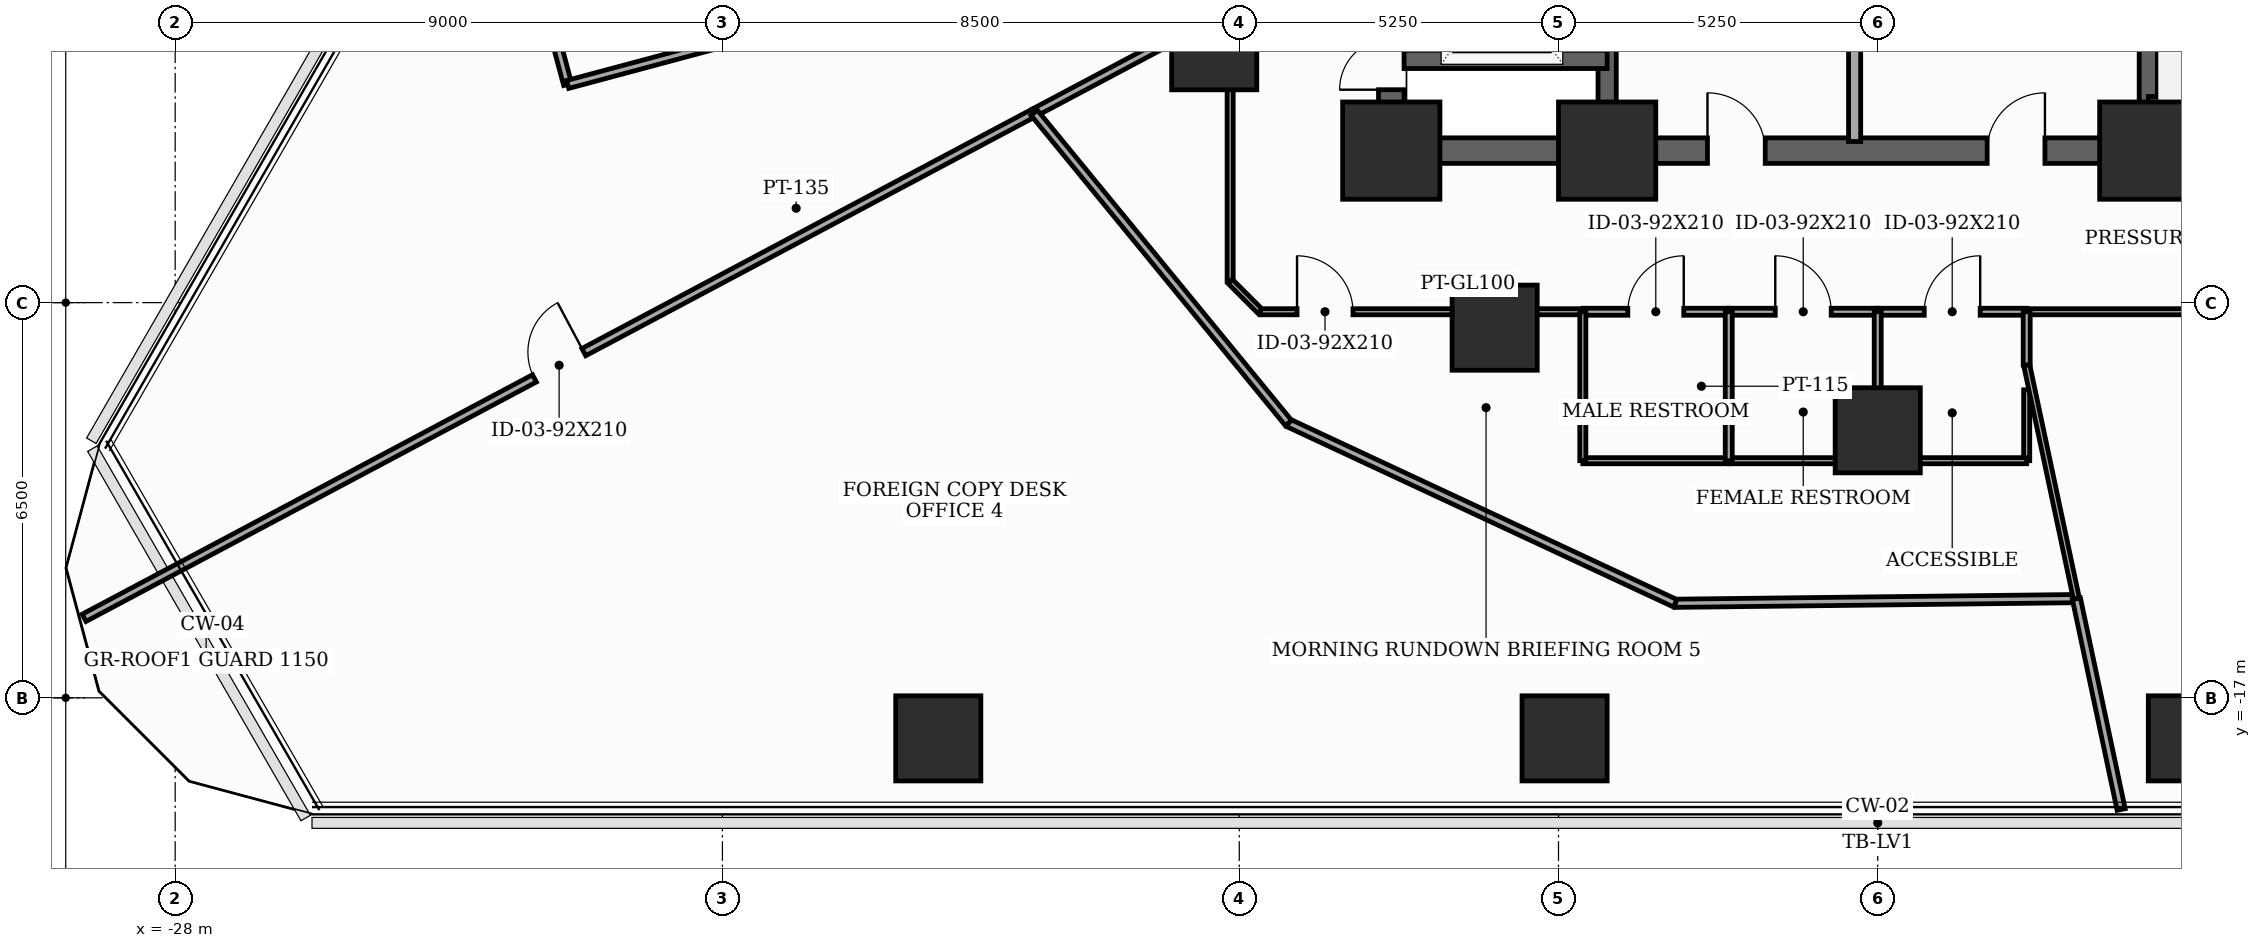
"""IFC4 building model, lengths in metres.
Left out: names, types, materials, properties, quantities, classifications, styles, units other than length and angle.
Written with IfcOpenShell. Run it as: python <this file> out.ifc"""

import sys

from ifc_helpers import new_model, si_unit, direction, frame, frame_2d, origin, origin_2d, place, context, subcontext, project, spatial, rectangle, extrude, element, fill, save


model = new_model("IFC4")
c1 = context("Model", 3, precision=1e-05, world=origin(), true_north=direction((0.0, 1.0)))
c2 = subcontext(c1, "Body", "Model", "MODEL_VIEW")
j1 = project(units=[si_unit("LENGTHUNIT", "METRE"), si_unit("PLANEANGLEUNIT", "RADIAN")], contexts=[c1])
p1 = place(None, origin())
s1 = spatial("IfcSite", under=j1, at=p1, CompositionType="ELEMENT")
p2 = place(p1, origin())
s2 = spatial("IfcBuilding", under=s1, at=p2, CompositionType="ELEMENT")
p3 = place(p2, frame((0.0, 0.0, 33.4)))
s3 = spatial("IfcBuildingStorey", under=s2, at=p3, CompositionType="ELEMENT", Elevation=33.4)
for number, where, z_axis, x_axis in (
    (1, (-8.0, -8.0, 0.0), (0.0, 0.0, 1.0), (1.0, 0.0, 0.0)),
    (2, (-4.45, -8.0, 0.0), (0.0, 0.0, 1.0), (1.0, 0.0, 0.0)),
    (3, (4.45, -8.0, 0.0), (0.0, 0.0, 1.0), (1.0, 0.0, 0.0)),
):
    element("IfcColumn", number, at=place(p3, frame(where, z_axis=z_axis, x_axis=x_axis)), inside=s3, PredefinedType="COLUMN", context=c2, shape_type="SweptSolid", body=[
        extrude(rectangle(XDim=1.6, YDim=1.6, at=origin_2d()), origin(), (0.0, 0.0, 1.0), 3.7),
    ])
for number, where, z_axis, x_axis in (
    (4, (-10.912, -6.3, 0.0), (0.0, 0.0, 1.0), (1.0, 0.0, 0.0)),
    (5, (-6.3, -10.912, 0.0), (0.0, 0.0, 1.0), (1.0, 0.0, 0.0)),
    (6, (0.0, -12.6, 0.0), (0.0, 0.0, 1.0), (1.0, 0.0, 0.0)),
    (7, (-15.45, -17.667, 0.0), (0.0, 0.0, 1.0), (1.0, 0.0, 0.0)),
    (8, (-5.15, -17.667, 0.0), (0.0, 0.0, 1.0), (1.0, 0.0, 0.0)),
    (9, (5.15, -17.667, 0.0), (0.0, 0.0, 1.0), (1.0, 0.0, 0.0)),
):
    element("IfcColumn", number, at=place(p3, frame(where, z_axis=z_axis, x_axis=x_axis)), inside=s3, PredefinedType="COLUMN", context=c2, shape_type="SweptSolid", body=[
        extrude(rectangle(XDim=1.4, YDim=1.4, at=origin_2d()), origin(), (0.0, 0.0, 1.0), 3.7),
    ])
p4 = place(p3, frame((-8.0, -8.0, 0.0), z_axis=(0.0, 0.0, 1.0), x_axis=(0.0, 1.0, 0.0)))
e10 = element("IfcWall", 10, at=p4, inside=s3, PredefinedType="SHEAR", context=c2, shape_type="SweptSolid", body=[
    extrude(rectangle(XDim=16.0, YDim=0.42, at=frame_2d((8.0, 0.0))), origin(), (0.0, 0.0, 1.0), 3.5),
])
p5 = place(p4, frame((1.002, 0.0, 0.0)))
e11 = element("IfcOpeningElement", 11, at=p5, cuts=e10, PredefinedType="OPENING", context=c2, shape_type="SweptSolid", body=[
    extrude(rectangle(XDim=0.85, YDim=2.02, at=frame_2d((0.425, 1.01))), frame((0.0, 0.22, 0.0), z_axis=(0.0, -1.0, 0.0), x_axis=(1.0, 0.0, 0.0)), (0.0, 0.0, 1.0), 0.44),
])
p6 = place(p4, frame((5.35, 0.0, 0.0)))
e12 = element("IfcOpeningElement", 12, at=p6, cuts=e10, PredefinedType="OPENING", context=c2, shape_type="SweptSolid", body=[
    extrude(rectangle(XDim=1.05, YDim=2.15, at=frame_2d((0.525, 1.075))), frame((0.0, 0.22, 0.0), z_axis=(0.0, -1.0, 0.0), x_axis=(1.0, 0.0, 0.0)), (0.0, 0.0, 1.0), 0.44),
])
p7 = place(p3, frame((-8.0, -8.0, 0.0), z_axis=(0.0, 0.0, 1.0), x_axis=(1.0, 0.0, 0.0)))
e13 = element("IfcWall", 13, at=p7, inside=s3, PredefinedType="SHEAR", context=c2, shape_type="SweptSolid", body=[
    extrude(rectangle(XDim=16.0, YDim=0.42, at=frame_2d((8.0, 0.0))), origin(), (0.0, 0.0, 1.0), 3.5),
])
p8 = place(p7, frame((5.2, 0.0, 0.0)))
e14 = element("IfcOpeningElement", 14, at=p8, cuts=e13, PredefinedType="OPENING", context=c2, shape_type="SweptSolid", body=[
    extrude(rectangle(XDim=0.95, YDim=2.1, at=frame_2d((0.475, 1.05))), frame((0.0, 0.22, 0.0), z_axis=(0.0, -1.0, 0.0), x_axis=(1.0, 0.0, 0.0)), (0.0, 0.0, 1.0), 0.44),
])
p9 = place(p7, frame((9.8, 0.0, 0.0)))
e15 = element("IfcOpeningElement", 15, at=p9, cuts=e13, PredefinedType="OPENING", context=c2, shape_type="SweptSolid", body=[
    extrude(rectangle(XDim=0.95, YDim=2.1, at=frame_2d((0.475, 1.05))), frame((0.0, 0.22, 0.0), z_axis=(0.0, -1.0, 0.0), x_axis=(1.0, 0.0, 0.0)), (0.0, 0.0, 1.0), 0.44),
])
for number, where, z_axis, x_axis in (
    (16, (-4.45, -7.79, 0.0), (0.0, 0.0, 1.0), (0.0, 1.0, 0.0)),
    (17, (4.45, -7.79, 0.0), (0.0, 0.0, 1.0), (0.0, 1.0, 0.0)),
):
    element("IfcWall", number, at=place(p3, frame(where, z_axis=z_axis, x_axis=x_axis)), inside=s3, PredefinedType="SHEAR", context=c2, shape_type="SweptSolid", body=[
        extrude(rectangle(XDim=15.58, YDim=0.3, at=frame_2d((7.79, 0.0))), origin(), (0.0, 0.0, 1.0), 3.5),
    ])
p10 = place(p3, frame((4.45, -7.26, 0.0), z_axis=(0.0, 0.0, 1.0), x_axis=(1.0, 0.0, 0.0)))
e18 = element("IfcWall", 18, at=p10, inside=s3, PredefinedType="SHEAR", context=c2, shape_type="SweptSolid", body=[
    extrude(rectangle(XDim=3.55, YDim=0.3, at=frame_2d((1.775, 0.0))), origin(), (0.0, 0.0, 1.0), 3.5),
])
p11 = place(p3, frame((-7.79, -6.5, 0.0), z_axis=(0.0, 0.0, 1.0), x_axis=(1.0, 0.0, 0.0)))
e19 = element("IfcWall", 19, at=p11, inside=s3, PredefinedType="SHEAR", context=c2, shape_type="SweptSolid", body=[
    extrude(rectangle(XDim=3.34, YDim=0.3, at=frame_2d((1.67, 0.0))), origin(), (0.0, 0.0, 1.0), 3.5),
])
p12 = place(p3, frame((-0.38, -7.85, 0.0), z_axis=(0.0, 0.0, 1.0), x_axis=(0.0, 1.0, 0.0)))
e20 = element("IfcWall", 20, at=p12, inside=s3, PredefinedType="SOLIDWALL", context=c2, shape_type="SweptSolid", body=[
    extrude(rectangle(XDim=2.95, YDim=0.2, at=frame_2d((1.475, 0.0))), origin(), (0.0, 0.0, 1.0), 2.885),
])
p13 = place(p3, frame((-22.115, -4.787, 0.0), z_axis=(0.0, 0.0, 1.0), x_axis=(0.259105843213, -0.965848933329, 0.0)))
e21 = element("IfcWall", 21, at=p13, inside=s3, PredefinedType="PARTITIONING", context=c2, shape_type="SweptSolid", body=[
    extrude(rectangle(XDim=2.2, YDim=0.135, at=frame_2d((1.1, 0.0))), origin(), (0.0, 0.0, 1.0), 2.935),
])
p14 = place(p3, frame((-21.545, -6.912, 0.0), z_axis=(0.0, 0.0, 1.0), x_axis=(0.965906888357, 0.258889712088, 0.0)))
e22 = element("IfcWall", 22, at=p14, inside=s3, PredefinedType="PARTITIONING", context=c2, shape_type="SweptSolid", body=[
    extrude(rectangle(XDim=11.28, YDim=0.135, at=frame_2d((5.64, 0.0))), origin(), (0.0, 0.0, 1.0), 2.785),
])
p15 = place(p3, frame((-10.65, -5.663, 0.0), z_axis=(0.0, 0.0, 1.0), x_axis=(0.0, -1.0, 0.0)))
e23 = element("IfcWall", 23, at=p15, inside=s3, PredefinedType="MOVABLE", context=c2, shape_type="SweptSolid", body=[
    extrude(rectangle(XDim=4.487, YDim=0.1, at=frame_2d((2.243, 0.0))), origin(), (0.0, 0.0, 1.0), 2.785),
])
p16 = place(p3, frame((-10.65, -10.15, 0.0), z_axis=(0.0, 0.0, 1.0), x_axis=(0.707106781187, -0.707106781187, 0.0)))
e24 = element("IfcWall", 24, at=p16, inside=s3, PredefinedType="MOVABLE", context=c2, shape_type="SweptSolid", body=[
    extrude(rectangle(XDim=0.707, YDim=0.1, at=frame_2d((0.354, 0.0))), origin(), (0.0, 0.0, 1.0), 3.5),
])
p17 = place(p3, frame((-10.15, -10.65, 0.0), z_axis=(0.0, 0.0, 1.0), x_axis=(1.0, 0.0, 0.0)))
e25 = element("IfcWall", 25, at=p17, inside=s3, PredefinedType="MOVABLE", context=c2, shape_type="SweptSolid", body=[
    extrude(rectangle(XDim=5.3, YDim=0.1, at=frame_2d((2.65, 0.0))), origin(), (0.0, 0.0, 1.0), 2.785),
])
p18 = place(p17, frame((0.6, 0.0, 0.0)))
e26 = element("IfcOpeningElement", 26, at=p18, cuts=e25, PredefinedType="OPENING", context=c2, shape_type="SweptSolid", body=[
    extrude(rectangle(XDim=0.92, YDim=2.1, at=frame_2d((0.46, 1.05))), frame((0.0, 0.06, 0.0), z_axis=(0.0, -1.0, 0.0), x_axis=(1.0, 0.0, 0.0)), (0.0, 0.0, 1.0), 0.12),
])
p19 = place(p3, frame((-4.85, -10.65, 0.0), z_axis=(0.0, 0.0, 1.0), x_axis=(1.0, 0.0, 0.0)))
e27 = element("IfcWall", 27, at=p19, inside=s3, PredefinedType="PARTITIONING", context=c2, shape_type="SweptSolid", body=[
    extrude(rectangle(XDim=2.4, YDim=0.115, at=frame_2d((1.2, 0.0))), origin(), (0.0, 0.0, 1.0), 3.5),
])
p20 = place(p19, frame((0.74, 0.0, 0.0)))
e28 = element("IfcOpeningElement", 28, at=p20, cuts=e27, PredefinedType="OPENING", context=c2, shape_type="SweptSolid", body=[
    extrude(rectangle(XDim=0.92, YDim=2.1, at=frame_2d((0.46, 1.05))), frame((0.0, 0.067, 0.0), z_axis=(0.0, -1.0, 0.0), x_axis=(1.0, 0.0, 0.0)), (0.0, 0.0, 1.0), 0.135),
])
p21 = place(p3, frame((-2.45, -10.65, 0.0), z_axis=(0.0, 0.0, 1.0), x_axis=(1.0, 0.0, 0.0)))
e29 = element("IfcWall", 29, at=p21, inside=s3, PredefinedType="PARTITIONING", context=c2, shape_type="SweptSolid", body=[
    extrude(rectangle(XDim=2.45, YDim=0.115, at=frame_2d((1.225, 0.0))), origin(), (0.0, 0.0, 1.0), 2.785),
])
p22 = place(p21, frame((0.765, 0.0, 0.0)))
e30 = element("IfcOpeningElement", 30, at=p22, cuts=e29, PredefinedType="OPENING", context=c2, shape_type="SweptSolid", body=[
    extrude(rectangle(XDim=0.92, YDim=2.1, at=frame_2d((0.46, 1.05))), frame((0.0, 0.067, 0.0), z_axis=(0.0, -1.0, 0.0), x_axis=(1.0, 0.0, 0.0)), (0.0, 0.0, 1.0), 0.135),
])
p23 = place(p3, frame((0.0, -10.65, 0.0), z_axis=(0.0, 0.0, 1.0), x_axis=(1.0, 0.0, 0.0)))
e31 = element("IfcWall", 31, at=p23, inside=s3, PredefinedType="PARTITIONING", context=c2, shape_type="SweptSolid", body=[
    extrude(rectangle(XDim=2.45, YDim=0.115, at=frame_2d((1.225, 0.0))), origin(), (0.0, 0.0, 1.0), 3.5),
])
p24 = place(p23, frame((0.765, 0.0, 0.0)))
e32 = element("IfcOpeningElement", 32, at=p24, cuts=e31, PredefinedType="OPENING", context=c2, shape_type="SweptSolid", body=[
    extrude(rectangle(XDim=0.92, YDim=2.1, at=frame_2d((0.46, 1.05))), frame((0.0, 0.067, 0.0), z_axis=(0.0, -1.0, 0.0), x_axis=(1.0, 0.0, 0.0)), (0.0, 0.0, 1.0), 0.135),
])
p25 = place(p3, frame((2.45, -10.65, 0.0), z_axis=(0.0, 0.0, 1.0), x_axis=(1.0, 0.0, 0.0)))
e33 = element("IfcWall", 33, at=p25, inside=s3, PredefinedType="MOVABLE", context=c2, shape_type="SweptSolid", body=[
    extrude(rectangle(XDim=7.7, YDim=0.1, at=frame_2d((3.85, 0.0))), origin(), (0.0, 0.0, 1.0), 2.785),
])
p26 = place(p3, frame((-29.498, -15.684, 0.0), z_axis=(0.0, 0.0, 1.0), x_axis=(0.882944182352, 0.46947797696, 0.0)))
e34 = element("IfcWall", 34, at=p26, inside=s3, PredefinedType="PARTITIONING", context=c2, shape_type="SweptSolid", body=[
    extrude(rectangle(XDim=17.697, YDim=0.135, at=frame_2d((8.848, 0.0))), origin(), (0.0, 0.0, 1.0), 2.935),
])
p27 = place(p26, frame((8.388, 0.0, 0.0)))
e35 = element("IfcOpeningElement", 35, at=p27, cuts=e34, PredefinedType="OPENING", context=c2, shape_type="SweptSolid", body=[
    extrude(rectangle(XDim=0.92, YDim=2.1, at=frame_2d((0.46, 1.05))), frame((0.0, 0.077, 0.0), z_axis=(0.0, -1.0, 0.0), x_axis=(1.0, 0.0, 0.0)), (0.0, 0.0, 1.0), 0.155),
])
p28 = place(p3, frame((-13.873, -7.376, 0.0), z_axis=(0.0, 0.0, 1.0), x_axis=(0.883048160598, 0.469282373486, 0.0)))
e36 = element("IfcWall", 36, at=p28, inside=s3, PredefinedType="PARTITIONING", context=c2, shape_type="SweptSolid", body=[
    extrude(rectangle(XDim=3.65, YDim=0.135, at=frame_2d((1.825, 0.0))), origin(), (0.0, 0.0, 1.0), 2.785),
])
p29 = place(p3, frame((3.267, -15.368, 0.0), z_axis=(0.0, 0.0, 1.0), x_axis=(-0.999931630146, -0.011693375588, 0.0)))
e37 = element("IfcWall", 37, at=p29, inside=s3, PredefinedType="PARTITIONING", context=c2, shape_type="SweptSolid", body=[
    extrude(rectangle(XDim=6.598, YDim=0.135, at=frame_2d((3.299, 0.0))), origin(), (0.0, 0.0, 1.0), 3.5),
])
p30 = place(p3, frame((-3.33, -15.445, 0.0), z_axis=(0.0, 0.0, 1.0), x_axis=(-0.90631018164, 0.422613126458, 0.0)))
e38 = element("IfcWall", 38, at=p30, inside=s3, PredefinedType="PARTITIONING", context=c2, shape_type="SweptSolid", body=[
    extrude(rectangle(XDim=7.018, YDim=0.135, at=frame_2d((3.509, 0.0))), origin(), (0.0, 0.0, 1.0), 2.685),
])
p31 = place(p3, frame((-9.691, -12.479, 0.0), z_axis=(0.0, 0.0, 1.0), x_axis=(-0.633866270814, 0.773442661562, 0.0)))
e39 = element("IfcWall", 39, at=p31, inside=s3, PredefinedType="PARTITIONING", context=c2, shape_type="SweptSolid", body=[
    extrude(rectangle(XDim=6.598, YDim=0.135, at=frame_2d((3.299, 0.0))), origin(), (0.0, 0.0, 1.0), 3.5),
])
p32 = place(p3, frame((4.003, -18.837, 0.0), z_axis=(0.0, 0.0, 1.0), x_axis=(-0.207633969896, 0.978206590933, 0.0)))
e40 = element("IfcWall", 40, at=p32, inside=s3, PredefinedType="PARTITIONING", context=c2, shape_type="SweptSolid", body=[
    extrude(rectangle(XDim=3.546, YDim=0.135, at=frame_2d((1.773, 0.0))), origin(), (0.0, 0.0, 1.0), 2.935),
])
p33 = place(p3, frame((-2.45, -13.1, 0.0), z_axis=(0.0, 0.0, 1.0), x_axis=(-1.0, 0.0, 0.0)))
e41 = element("IfcWall", 41, at=p33, inside=s3, PredefinedType="MOVABLE", context=c2, shape_type="SweptSolid", body=[
    extrude(rectangle(XDim=2.4, YDim=0.1, at=frame_2d((1.2, 0.0))), origin(), (0.0, 0.0, 1.0), 3.5),
])
p34 = place(p3, frame((-4.85, -13.1, 0.0), z_axis=(0.0, 0.0, 1.0), x_axis=(0.0, 1.0, 0.0)))
e42 = element("IfcWall", 42, at=p34, inside=s3, PredefinedType="MOVABLE", context=c2, shape_type="SweptSolid", body=[
    extrude(rectangle(XDim=2.45, YDim=0.1, at=frame_2d((1.225, 0.0))), origin(), (0.0, 0.0, 1.0), 2.785),
])
p35 = place(p3, frame((0.0, -13.1, 0.0), z_axis=(0.0, 0.0, 1.0), x_axis=(-1.0, 0.0, 0.0)))
e43 = element("IfcWall", 43, at=p35, inside=s3, PredefinedType="MOVABLE", context=c2, shape_type="SweptSolid", body=[
    extrude(rectangle(XDim=2.45, YDim=0.1, at=frame_2d((1.225, 0.0))), origin(), (0.0, 0.0, 1.0), 3.5),
])
p36 = place(p3, frame((2.45, -11.935, 0.0), z_axis=(0.0, 0.0, 1.0), x_axis=(0.0, -1.0, 0.0)))
e44 = element("IfcWall", 44, at=p36, inside=s3, PredefinedType="MOVABLE", context=c2, shape_type="SweptSolid", body=[
    extrude(rectangle(XDim=1.166, YDim=0.1, at=frame_2d((0.583, 0.0))), origin(), (0.0, 0.0, 1.0), 2.785),
])
p37 = place(p3, frame((2.45, -13.1, 0.0), z_axis=(0.0, 0.0, 1.0), x_axis=(-1.0, 0.0, 0.0)))
e45 = element("IfcWall", 45, at=p37, inside=s3, PredefinedType="MOVABLE", context=c2, shape_type="SweptSolid", body=[
    extrude(rectangle(XDim=2.45, YDim=0.1, at=frame_2d((1.225, 0.0))), origin(), (0.0, 0.0, 1.0), 3.5),
])
p38 = place(p3, frame((3.267, -15.368, 0.0), z_axis=(0.0, 0.0, 1.0), x_axis=(-0.208030469109, 0.978122346091, 0.0)))
e46 = element("IfcWall", 46, at=p38, inside=s3, PredefinedType="MOVABLE", context=c2, shape_type="SweptSolid", body=[
    extrude(rectangle(XDim=3.928, YDim=0.1, at=frame_2d((1.964, 0.0))), origin(), (0.0, 0.0, 1.0), 2.785),
])
for number, where, z_axis, x_axis in (
    (47, (-2.45, -13.1, 0.0), (0.0, 0.0, 1.0), (0.0, 1.0, 0.0)),
    (48, (0.0, -13.1, 0.0), (0.0, 0.0, 1.0), (0.0, 1.0, 0.0)),
):
    element("IfcWall", number, at=place(p3, frame(where, z_axis=z_axis, x_axis=x_axis)), inside=s3, PredefinedType="PARTITIONING", context=c2, shape_type="SweptSolid", body=[
        extrude(rectangle(XDim=2.45, YDim=0.115, at=frame_2d((1.225, 0.0))), origin(), (0.0, 0.0, 1.0), 2.785),
    ])
p39 = place(p3, frame((2.45, -11.526, 0.0), z_axis=(0.0, 0.0, 1.0), x_axis=(0.0, 1.0, 0.0)))
e49 = element("IfcWall", 49, at=p39, inside=s3, PredefinedType="PARTITIONING", context=c2, shape_type="SweptSolid", body=[
    extrude(rectangle(XDim=0.876, YDim=0.115, at=frame_2d((0.438, 0.0))), origin(), (0.0, 0.0, 1.0), 3.5),
])
p40 = place(p5, origin())
e50 = element("IfcDoor", 50, at=p40, inside=s3, OperationType="SINGLE_SWING_LEFT", PredefinedType="TRAPDOOR", context=c2, shape_type="SweptSolid", body=[
    extrude(rectangle(XDim=0.85, YDim=2.02, at=frame_2d((0.425, 1.01))), frame((0.0, 0.025, 0.0), z_axis=(0.0, -1.0, 0.0), x_axis=(1.0, 0.0, 0.0)), (0.0, 0.0, 1.0), 0.05),
])
fill(e11, e50)
p41 = place(p8, origin())
e51 = element("IfcDoor", 51, at=p41, inside=s3, OperationType="SINGLE_SWING_LEFT", PredefinedType="DOOR", context=c2, shape_type="SweptSolid", body=[
    extrude(rectangle(XDim=0.95, YDim=2.1, at=frame_2d((0.475, 1.05))), frame((0.0, 0.025, 0.0), z_axis=(0.0, -1.0, 0.0), x_axis=(1.0, 0.0, 0.0)), (0.0, 0.0, 1.0), 0.05),
])
fill(e14, e51)
p42 = place(p9, origin())
e52 = element("IfcDoor", 52, at=p42, inside=s3, OperationType="SINGLE_SWING_RIGHT", PredefinedType="DOOR", context=c2, shape_type="SweptSolid", body=[
    extrude(rectangle(XDim=0.95, YDim=2.1, at=frame_2d((0.475, 1.05))), frame((0.0, 0.025, 0.0), z_axis=(0.0, -1.0, 0.0), x_axis=(1.0, 0.0, 0.0)), (0.0, 0.0, 1.0), 0.05),
])
fill(e15, e52)
p43 = place(p18, origin())
e53 = element("IfcDoor", 53, at=p43, inside=s3, OperationType="SINGLE_SWING_LEFT", PredefinedType="DOOR", context=c2, shape_type="SweptSolid", body=[
    extrude(rectangle(XDim=0.92, YDim=2.1, at=frame_2d((0.46, 1.05))), frame((0.0, 0.025, 0.0), z_axis=(0.0, -1.0, 0.0), x_axis=(1.0, 0.0, 0.0)), (0.0, 0.0, 1.0), 0.05),
])
fill(e26, e53)
p44 = place(p20, origin())
e54 = element("IfcDoor", 54, at=p44, inside=s3, OperationType="SINGLE_SWING_RIGHT", PredefinedType="DOOR", context=c2, shape_type="SweptSolid", body=[
    extrude(rectangle(XDim=0.92, YDim=2.1, at=frame_2d((0.46, 1.05))), frame((0.0, 0.025, 0.0), z_axis=(0.0, -1.0, 0.0), x_axis=(1.0, 0.0, 0.0)), (0.0, 0.0, 1.0), 0.05),
])
fill(e28, e54)
p45 = place(p22, origin())
e55 = element("IfcDoor", 55, at=p45, inside=s3, OperationType="SINGLE_SWING_LEFT", PredefinedType="DOOR", context=c2, shape_type="SweptSolid", body=[
    extrude(rectangle(XDim=0.92, YDim=2.1, at=frame_2d((0.46, 1.05))), frame((0.0, 0.025, 0.0), z_axis=(0.0, -1.0, 0.0), x_axis=(1.0, 0.0, 0.0)), (0.0, 0.0, 1.0), 0.05),
])
fill(e30, e55)
p46 = place(p24, origin())
e56 = element("IfcDoor", 56, at=p46, inside=s3, OperationType="SINGLE_SWING_RIGHT", PredefinedType="DOOR", context=c2, shape_type="SweptSolid", body=[
    extrude(rectangle(XDim=0.92, YDim=2.1, at=frame_2d((0.46, 1.05))), frame((0.0, 0.025, 0.0), z_axis=(0.0, -1.0, 0.0), x_axis=(1.0, 0.0, 0.0)), (0.0, 0.0, 1.0), 0.05),
])
fill(e32, e56)
p47 = place(p27, origin())
e57 = element("IfcDoor", 57, at=p47, inside=s3, OperationType="SINGLE_SWING_RIGHT", PredefinedType="DOOR", context=c2, shape_type="SweptSolid", body=[
    extrude(rectangle(XDim=0.92, YDim=2.1, at=frame_2d((0.46, 1.05))), frame((0.0, 0.025, 0.0), z_axis=(0.0, -1.0, 0.0), x_axis=(1.0, 0.0, 0.0)), (0.0, 0.0, 1.0), 0.05),
])
fill(e35, e57)
save(model, sys.argv[1])
